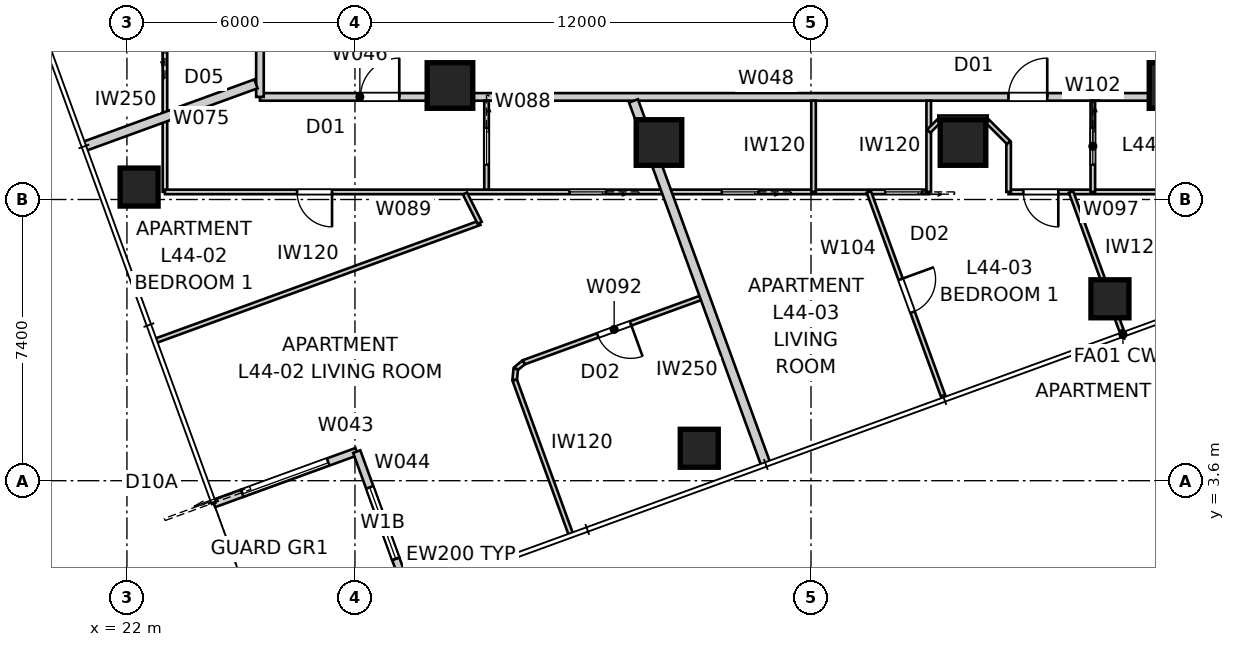
"""IFC4 building model, lengths in metres.
Left out: names, types, materials, properties, quantities, classifications, styles, units other than length and angle.
Written with IfcOpenShell. Run it as: python <this file> out.ifc"""

import sys

from ifc_helpers import new_model, si_unit, direction, frame, frame_2d, origin, origin_2d, place, context, subcontext, project, spatial, rectangle, extrude, element, fill, save


model = new_model("IFC4")
c1 = context("Model", 3, precision=1e-05, world=origin(), true_north=direction((0.0, 1.0)))
c2 = subcontext(c1, "Body", "Model", "MODEL_VIEW")
j1 = project(units=[si_unit("LENGTHUNIT", "METRE"), si_unit("PLANEANGLEUNIT", "RADIAN")], contexts=[c1])
p1 = place(None, origin())
s1 = spatial("IfcSite", under=j1, at=p1, CompositionType="ELEMENT")
p2 = place(p1, origin())
s2 = spatial("IfcBuilding", under=s1, at=p2, CompositionType="ELEMENT")
p3 = place(p2, frame((0.0, 0.0, 160.8)))
s3 = spatial("IfcBuildingStorey", under=s2, at=p3, CompositionType="ELEMENT", Elevation=160.8)
for number, where, z_axis, x_axis in (
    (1, (37.06, 4.454, 0.0), (0.0, 0.0, 1.0), (1.0, 0.0, 0.0)),
    (2, (47.866, 8.387, 0.0), (0.0, 0.0, 1.0), (1.0, 0.0, 0.0)),
    (3, (22.32, 11.327, 0.0), (0.0, 0.0, 1.0), (1.0, 0.0, 0.0)),
):
    element("IfcColumn", number, at=place(p3, frame(where, z_axis=z_axis, x_axis=x_axis)), inside=s3, PredefinedType="COLUMN", context=c2, shape_type="SweptSolid", body=[
        extrude(rectangle(XDim=1.0, YDim=1.0, at=origin_2d()), origin(), (0.0, 0.0, 1.0), 3.4),
    ])
for number, where, z_axis, x_axis in (
    (4, (30.5, 14.0, 0.0), (0.0, 0.0, 1.0), (1.0, 0.0, 0.0)),
    (5, (36.0, 12.5, 0.0), (0.0, 0.0, 1.0), (1.0, 0.0, 0.0)),
    (6, (44.0, 12.5, 0.0), (0.0, 0.0, 1.0), (1.0, 0.0, 0.0)),
    (7, (49.5, 14.0, 0.0), (0.0, 0.0, 1.0), (1.0, 0.0, 0.0)),
):
    element("IfcColumn", number, at=place(p3, frame(where, z_axis=z_axis, x_axis=x_axis)), inside=s3, PredefinedType="COLUMN", context=c2, shape_type="SweptSolid", body=[
        extrude(rectangle(XDim=1.2, YDim=1.2, at=origin_2d()), origin(), (0.0, 0.0, 1.0), 3.4),
    ])
p4 = place(p3, frame((24.288, 2.998, 0.0), z_axis=(0.0, 0.0, 1.0), x_axis=(0.939659694648, 0.342110593602, 0.0)))
e8 = element("IfcWall", 8, at=p4, inside=s3, PredefinedType="SOLIDWALL", context=c2, shape_type="SweptSolid", body=[
    extrude(rectangle(XDim=0.8, YDim=0.2, at=frame_2d((0.4, 0.0))), origin(), (0.0, 0.0, 1.0), 3.25),
])
p5 = place(p3, frame((25.04, 3.271, 0.0), z_axis=(0.0, 0.0, 1.0), x_axis=(0.939693144909, 0.342018703306, 0.0)))
e9 = element("IfcWall", 9, at=p5, inside=s3, PredefinedType="SOLIDWALL", context=c2, shape_type="SweptSolid", body=[
    extrude(rectangle(XDim=3.2, YDim=0.2, at=frame_2d((1.6, 0.0))), origin(), (0.0, 0.0, 1.0), 2.722),
])
p6 = place(p5, origin())
e10 = element("IfcOpeningElement", 10, at=p6, cuts=e9, PredefinedType="OPENING", context=c2, shape_type="SweptSolid", body=[
    extrude(rectangle(XDim=2.4, YDim=2.1, at=frame_2d((1.2, 1.05))), frame((0.0, 0.11, 0.0), z_axis=(0.0, -1.0, 0.0), x_axis=(1.0, 0.0, 0.0)), (0.0, 0.0, 1.0), 0.22),
])
p7 = place(p3, frame((28.047, 4.366, 0.0), z_axis=(0.0, 0.0, 1.0), x_axis=(0.341965219194, -0.939712609717, 0.0)))
e11 = element("IfcWall", 11, at=p7, inside=s3, PredefinedType="SOLIDWALL", context=c2, shape_type="SweptSolid", body=[
    extrude(rectangle(XDim=3.0, YDim=0.2, at=frame_2d((1.5, 0.0))), origin(), (0.0, 0.0, 1.0), 2.722),
])
p8 = place(p7, frame((1.0, 0.0, 0.45)))
e12 = element("IfcOpeningElement", 12, at=p8, cuts=e11, PredefinedType="OPENING", context=c2, shape_type="SweptSolid", body=[
    extrude(rectangle(XDim=2.0, YDim=1.8, at=frame_2d((1.0, 0.9))), frame((0.0, 0.11, 0.0), z_axis=(0.0, -1.0, 0.0), x_axis=(1.0, 0.0, 0.0)), (0.0, 0.0, 1.0), 0.22),
])
p9 = place(p3, frame((29.073, 1.547, 0.0), z_axis=(0.0, 0.0, 1.0), x_axis=(0.342037080957, -0.939686455819, 0.0)))
e13 = element("IfcWall", 13, at=p9, inside=s3, PredefinedType="SOLIDWALL", context=c2, shape_type="SweptSolid", body=[
    extrude(rectangle(XDim=1.0, YDim=0.2, at=frame_2d((0.5, 0.0))), origin(), (0.0, 0.0, 1.0), 3.25),
])
p10 = place(p3, frame((25.5, 13.7, 0.0), z_axis=(0.0, 0.0, 1.0), x_axis=(1.0, 0.0, 0.0)))
e14 = element("IfcWall", 14, at=p10, inside=s3, PredefinedType="PARTITIONING", context=c2, shape_type="SweptSolid", body=[
    extrude(rectangle(XDim=5.258, YDim=0.2, at=frame_2d((2.629, 0.0))), origin(), (0.0, 0.0, 1.0), 3.25),
])
p11 = place(p10, frame((2.646, 0.0, 0.0)))
e15 = element("IfcOpeningElement", 15, at=p11, cuts=e14, PredefinedType="OPENING", context=c2, shape_type="SweptSolid", body=[
    extrude(rectangle(XDim=1.02, YDim=2.34, at=frame_2d((0.51, 1.17))), frame((0.0, 0.11, 0.0), z_axis=(0.0, -1.0, 0.0), x_axis=(1.0, 0.0, 0.0)), (0.0, 0.0, 1.0), 0.22),
])
p12 = place(p3, frame((30.758, 13.7, 0.0), z_axis=(0.0, 0.0, 1.0), x_axis=(1.0, 0.0, 0.0)))
e16 = element("IfcWall", 16, at=p12, inside=s3, PredefinedType="PARTITIONING", context=c2, shape_type="SweptSolid", body=[
    extrude(rectangle(XDim=1.683, YDim=0.2, at=frame_2d((0.842, 0.0))), origin(), (0.0, 0.0, 1.0), 2.55),
])
p13 = place(p3, frame((32.442, 13.7, 0.0), z_axis=(0.0, 0.0, 1.0), x_axis=(1.0, 0.0, 0.0)))
e17 = element("IfcWall", 17, at=p13, inside=s3, PredefinedType="PARTITIONING", context=c2, shape_type="SweptSolid", body=[
    extrude(rectangle(XDim=15.117, YDim=0.2, at=frame_2d((7.558, 0.0))), origin(), (0.0, 0.0, 1.0), 3.25),
])
p14 = place(p13, frame((12.755, 0.0, 0.0)))
e18 = element("IfcOpeningElement", 18, at=p14, cuts=e17, PredefinedType="OPENING", context=c2, shape_type="SweptSolid", body=[
    extrude(rectangle(XDim=1.02, YDim=2.34, at=frame_2d((0.51, 1.17))), frame((0.0, 0.11, 0.0), z_axis=(0.0, -1.0, 0.0), x_axis=(1.0, 0.0, 0.0)), (0.0, 0.0, 1.0), 0.22),
])
p15 = place(p3, frame((47.558, 13.7, 0.0), z_axis=(0.0, 0.0, 1.0), x_axis=(1.0, 0.0, 0.0)))
e19 = element("IfcWall", 19, at=p15, inside=s3, PredefinedType="PARTITIONING", context=c2, shape_type="SweptSolid", body=[
    extrude(rectangle(XDim=1.683, YDim=0.2, at=frame_2d((0.842, 0.0))), origin(), (0.0, 0.0, 1.0), 2.55),
])
p16 = place(p3, frame((25.5, 47.1, 0.0), z_axis=(0.0, 0.0, 1.0), x_axis=(0.0, -1.0, 0.0)))
e20 = element("IfcWall", 20, at=p16, inside=s3, PredefinedType="PARTITIONING", context=c2, shape_type="SweptSolid", body=[
    extrude(rectangle(XDim=33.4, YDim=0.2, at=frame_2d((16.7, 0.0))), origin(), (0.0, 0.0, 1.0), 3.25),
])
p17 = place(p16, frame((2.52, 0.0, 0.0)))
e21 = element("IfcOpeningElement", 21, at=p17, cuts=e20, PredefinedType="OPENING", context=c2, shape_type="SweptSolid", body=[
    extrude(rectangle(XDim=1.02, YDim=2.34, at=frame_2d((0.51, 1.17))), frame((0.0, 0.11, 0.0), z_axis=(0.0, -1.0, 0.0), x_axis=(1.0, 0.0, 0.0)), (0.0, 0.0, 1.0), 0.22),
])
p18 = place(p16, frame((27.383, 0.0, 0.0)))
e22 = element("IfcOpeningElement", 22, at=p18, cuts=e20, PredefinedType="OPENING", context=c2, shape_type="SweptSolid", body=[
    extrude(rectangle(XDim=1.02, YDim=2.1, at=frame_2d((0.51, 1.05))), frame((0.0, 0.11, 0.0), z_axis=(0.0, -1.0, 0.0), x_axis=(1.0, 0.0, 0.0)), (0.0, 0.0, 1.0), 0.22),
])
p19 = place(p3, frame((38.812, 4.027, 0.0), z_axis=(0.0, 0.0, 1.0), x_axis=(-0.342027987857, 0.939689765573, 0.0)))
e23 = element("IfcWall", 23, at=p19, inside=s3, PredefinedType="PARTITIONING", context=c2, shape_type="SweptSolid", body=[
    extrude(rectangle(XDim=10.182, YDim=0.25, at=frame_2d((5.091, 0.0))), origin(), (0.0, 0.0, 1.0), 3.25),
])
p20 = place(p3, frame((20.868, 12.395, 0.0), z_axis=(0.0, 0.0, 1.0), x_axis=(0.939677962656, 0.342060413521, 0.0)))
e24 = element("IfcWall", 24, at=p20, inside=s3, PredefinedType="PARTITIONING", context=c2, shape_type="SweptSolid", body=[
    extrude(rectangle(XDim=4.818, YDim=0.25, at=frame_2d((2.409, 0.0))), origin(), (0.0, 0.0, 1.0), 3.25),
])
p21 = place(p3, frame((23.0, 11.2, 0.0), z_axis=(0.0, 0.0, 1.0), x_axis=(0.0, 1.0, 0.0)))
e25 = element("IfcWall", 25, at=p21, inside=s3, PredefinedType="PARTITIONING", context=c2, shape_type="SweptSolid", body=[
    extrude(rectangle(XDim=8.1, YDim=0.12, at=frame_2d((4.05, 0.0))), origin(), (0.0, 0.0, 1.0), 3.25),
])
p22 = place(p21, frame((3.849, 0.0, 0.0)))
e26 = element("IfcOpeningElement", 26, at=p22, cuts=e25, PredefinedType="OPENING", context=c2, shape_type="SweptSolid", body=[
    extrude(rectangle(XDim=0.96, YDim=2.1, at=frame_2d((0.48, 1.05))), frame((0.0, 0.07, 0.0), z_axis=(0.0, -1.0, 0.0), x_axis=(1.0, 0.0, 0.0)), (0.0, 0.0, 1.0), 0.14),
])
p23 = place(p3, frame((31.462, 13.6, 0.0), z_axis=(0.0, 0.0, 1.0), x_axis=(0.0, -1.0, 0.0)))
e27 = element("IfcWall", 27, at=p23, inside=s3, PredefinedType="PARTITIONING", context=c2, shape_type="SweptSolid", body=[
    extrude(rectangle(XDim=2.4, YDim=0.12, at=frame_2d((1.2, 0.0))), origin(), (0.0, 0.0, 1.0), 3.25),
])
p24 = place(p23, frame((0.72, 0.0, 0.0)))
e28 = element("IfcOpeningElement", 28, at=p24, cuts=e27, PredefinedType="OPENING", context=c2, shape_type="SweptSolid", body=[
    extrude(rectangle(XDim=0.96, YDim=2.1, at=frame_2d((0.48, 1.05))), frame((0.0, 0.07, 0.0), z_axis=(0.0, -1.0, 0.0), x_axis=(1.0, 0.0, 0.0)), (0.0, 0.0, 1.0), 0.14),
])
p25 = place(p3, frame((43.098, 11.2, 0.0), z_axis=(0.0, 0.0, 1.0), x_axis=(-1.0, 0.0, 0.0)))
e29 = element("IfcWall", 29, at=p25, inside=s3, PredefinedType="PARTITIONING", context=c2, shape_type="SweptSolid", body=[
    extrude(rectangle(XDim=20.098, YDim=0.12, at=frame_2d((10.049, 0.0))), origin(), (0.0, 0.0, 1.0), 3.25),
])
p26 = place(p25, frame((15.701, 0.0, 0.0)))
e30 = element("IfcOpeningElement", 30, at=p26, cuts=e29, PredefinedType="OPENING", context=c2, shape_type="SweptSolid", body=[
    extrude(rectangle(XDim=0.92, YDim=2.34, at=frame_2d((0.46, 1.17))), frame((0.0, 0.07, 0.0), z_axis=(0.0, -1.0, 0.0), x_axis=(1.0, 0.0, 0.0)), (0.0, 0.0, 1.0), 0.14),
])
p27 = place(p25, frame((8.49, 0.0, 0.0)))
e31 = element("IfcOpeningElement", 31, at=p27, cuts=e29, PredefinedType="OPENING", context=c2, shape_type="SweptSolid", body=[
    extrude(rectangle(XDim=0.96, YDim=2.1, at=frame_2d((0.48, 1.05))), frame((0.0, 0.07, 0.0), z_axis=(0.0, -1.0, 0.0), x_axis=(1.0, 0.0, 0.0)), (0.0, 0.0, 1.0), 0.14),
])
p28 = place(p25, frame((0.185, 0.0, 0.0)))
e32 = element("IfcOpeningElement", 32, at=p28, cuts=e29, PredefinedType="OPENING", context=c2, shape_type="SweptSolid", body=[
    extrude(rectangle(XDim=0.96, YDim=2.1, at=frame_2d((0.48, 1.05))), frame((0.0, 0.07, 0.0), z_axis=(0.0, -1.0, 0.0), x_axis=(1.0, 0.0, 0.0)), (0.0, 0.0, 1.0), 0.14),
])
p29 = place(p25, frame((4.484, 0.0, 0.0)))
e33 = element("IfcOpeningElement", 33, at=p29, cuts=e29, PredefinedType="OPENING", context=c2, shape_type="SweptSolid", body=[
    extrude(rectangle(XDim=0.96, YDim=2.1, at=frame_2d((0.48, 1.05))), frame((0.0, 0.07, 0.0), z_axis=(0.0, -1.0, 0.0), x_axis=(1.0, 0.0, 0.0)), (0.0, 0.0, 1.0), 0.14),
])
p30 = place(p3, frame((22.769, 7.287, 0.0), z_axis=(0.0, 0.0, 1.0), x_axis=(0.939692673089, 0.342019999623, 0.0)))
e34 = element("IfcWall", 34, at=p30, inside=s3, PredefinedType="PARTITIONING", context=c2, shape_type="SweptSolid", body=[
    extrude(rectangle(XDim=9.06, YDim=0.12, at=frame_2d((4.53, 0.0))), origin(), (0.0, 0.0, 1.0), 3.25),
])
p31 = place(p3, frame((31.283, 10.385, 0.0), z_axis=(0.0, 0.0, 1.0), x_axis=(-0.448117513314, 0.893974660861, 0.0)))
e35 = element("IfcWall", 35, at=p31, inside=s3, PredefinedType="PARTITIONING", context=c2, shape_type="SweptSolid", body=[
    extrude(rectangle(XDim=0.864, YDim=0.12, at=frame_2d((0.432, 0.0))), origin(), (0.0, 0.0, 1.0), 3.25),
])
p32 = place(p3, frame((37.202, 8.449, 0.0), z_axis=(0.0, 0.0, 1.0), x_axis=(-0.939692115443, -0.34202153174, 0.0)))
e36 = element("IfcWall", 36, at=p32, inside=s3, PredefinedType="PARTITIONING", context=c2, shape_type="SweptSolid", body=[
    extrude(rectangle(XDim=5.068, YDim=0.12, at=frame_2d((2.534, 0.0))), origin(), (0.0, 0.0, 1.0), 3.25),
])
p33 = place(p32, frame((2.074, 0.0, 0.0)))
e37 = element("IfcOpeningElement", 37, at=p33, cuts=e36, PredefinedType="OPENING", context=c2, shape_type="SweptSolid", body=[
    extrude(rectangle(XDim=0.92, YDim=2.34, at=frame_2d((0.46, 1.17))), frame((0.0, 0.07, 0.0), z_axis=(0.0, -1.0, 0.0), x_axis=(1.0, 0.0, 0.0)), (0.0, 0.0, 1.0), 0.14),
])
p34 = place(p3, frame((32.44, 6.715, 0.0), z_axis=(0.0, 0.0, 1.0), x_axis=(-0.769401529914, -0.638765438769, 0.0)))
e38 = element("IfcWall", 38, at=p34, inside=s3, PredefinedType="PARTITIONING", context=c2, shape_type="SweptSolid", body=[
    extrude(rectangle(XDim=0.271, YDim=0.12, at=frame_2d((0.135, 0.0))), origin(), (0.0, 0.0, 1.0), 3.25),
])
p35 = place(p3, frame((32.231, 6.542, 0.0), z_axis=(0.0, 0.0, 1.0), x_axis=(-0.093212941297, -0.995646195983, 0.0)))
e39 = element("IfcWall", 39, at=p35, inside=s3, PredefinedType="PARTITIONING", context=c2, shape_type="SweptSolid", body=[
    extrude(rectangle(XDim=0.296, YDim=0.12, at=frame_2d((0.148, 0.0))), origin(), (0.0, 0.0, 1.0), 3.25),
])
p36 = place(p3, frame((32.204, 6.248, 0.0), z_axis=(0.0, 0.0, 1.0), x_axis=(0.342011603146, -0.939695729113, 0.0)))
e40 = element("IfcWall", 40, at=p36, inside=s3, PredefinedType="PARTITIONING", context=c2, shape_type="SweptSolid", body=[
    extrude(rectangle(XDim=4.307, YDim=0.12, at=frame_2d((2.153, 0.0))), origin(), (0.0, 0.0, 1.0), 3.25),
])
p37 = place(p3, frame((43.098, 11.2, 0.0), z_axis=(0.0, 0.0, 1.0), x_axis=(0.0, 1.0, 0.0)))
e41 = element("IfcWall", 41, at=p37, inside=s3, PredefinedType="PARTITIONING", context=c2, shape_type="SweptSolid", body=[
    extrude(rectangle(XDim=2.4, YDim=0.12, at=frame_2d((1.2, 0.0))), origin(), (0.0, 0.0, 1.0), 3.25),
])
p38 = place(p3, frame((52.164, 11.2, 0.0), z_axis=(0.0, 0.0, 1.0), x_axis=(-1.0, 0.0, 0.0)))
e42 = element("IfcWall", 42, at=p38, inside=s3, PredefinedType="PARTITIONING", context=c2, shape_type="SweptSolid", body=[
    extrude(rectangle(XDim=6.964, YDim=0.12, at=frame_2d((3.482, 0.0))), origin(), (0.0, 0.0, 1.0), 3.25),
])
p39 = place(p38, frame((5.656, 0.0, 0.0)))
e43 = element("IfcOpeningElement", 43, at=p39, cuts=e42, PredefinedType="OPENING", context=c2, shape_type="SweptSolid", body=[
    extrude(rectangle(XDim=0.92, YDim=2.34, at=frame_2d((0.46, 1.17))), frame((0.0, 0.07, 0.0), z_axis=(0.0, -1.0, 0.0), x_axis=(1.0, 0.0, 0.0)), (0.0, 0.0, 1.0), 0.14),
])
p40 = place(p38, frame((1.919, 0.0, 0.0)))
e44 = element("IfcOpeningElement", 44, at=p40, cuts=e42, PredefinedType="OPENING", context=c2, shape_type="SweptSolid", body=[
    extrude(rectangle(XDim=0.96, YDim=2.1, at=frame_2d((0.48, 1.05))), frame((0.0, 0.07, 0.0), z_axis=(0.0, -1.0, 0.0), x_axis=(1.0, 0.0, 0.0)), (0.0, 0.0, 1.0), 0.14),
])
p41 = place(p3, frame((45.2, 11.2, 0.0), z_axis=(0.0, 0.0, 1.0), x_axis=(0.0, 1.0, 0.0)))
e45 = element("IfcWall", 45, at=p41, inside=s3, PredefinedType="PARTITIONING", context=c2, shape_type="SweptSolid", body=[
    extrude(rectangle(XDim=1.3, YDim=0.12, at=frame_2d((0.65, 0.0))), origin(), (0.0, 0.0, 1.0), 3.25),
])
p42 = place(p3, frame((45.2, 12.5, 0.0), z_axis=(0.0, 0.0, 1.0), x_axis=(-0.707106781187, 0.707106781187, 0.0)))
e46 = element("IfcWall", 46, at=p42, inside=s3, PredefinedType="PARTITIONING", context=c2, shape_type="SweptSolid", body=[
    extrude(rectangle(XDim=0.778, YDim=0.12, at=frame_2d((0.389, 0.0))), origin(), (0.0, 0.0, 1.0), 3.25),
])
p43 = place(p3, frame((44.65, 13.15, 0.0), z_axis=(0.0, 0.0, 1.0), x_axis=(-1.0, 0.0, 0.0)))
e47 = element("IfcWall", 47, at=p43, inside=s3, PredefinedType="PARTITIONING", context=c2, shape_type="SweptSolid", body=[
    extrude(rectangle(XDim=1.3, YDim=0.12, at=frame_2d((0.65, 0.0))), origin(), (0.0, 0.0, 1.0), 3.25),
])
p44 = place(p3, frame((43.35, 13.05, 0.0), z_axis=(0.0, 0.0, 1.0), x_axis=(-0.707106781187, -0.707106781187, 0.0)))
e48 = element("IfcWall", 48, at=p44, inside=s3, PredefinedType="PARTITIONING", context=c2, shape_type="SweptSolid", body=[
    extrude(rectangle(XDim=0.357, YDim=0.12, at=frame_2d((0.178, 0.0))), origin(), (0.0, 0.0, 1.0), 3.25),
])
p45 = place(p3, frame((47.416, 13.6, 0.0), z_axis=(0.0, 0.0, 1.0), x_axis=(0.0, -1.0, 0.0)))
e49 = element("IfcWall", 49, at=p45, inside=s3, PredefinedType="PARTITIONING", context=c2, shape_type="SweptSolid", body=[
    extrude(rectangle(XDim=2.4, YDim=0.12, at=frame_2d((1.2, 0.0))), origin(), (0.0, 0.0, 1.0), 3.25),
])
p46 = place(p45, frame((0.72, 0.0, 0.0)))
e50 = element("IfcOpeningElement", 50, at=p46, cuts=e49, PredefinedType="OPENING", context=c2, shape_type="SweptSolid", body=[
    extrude(rectangle(XDim=0.96, YDim=2.1, at=frame_2d((0.48, 1.05))), frame((0.0, 0.07, 0.0), z_axis=(0.0, -1.0, 0.0), x_axis=(1.0, 0.0, 0.0)), (0.0, 0.0, 1.0), 0.14),
])
p47 = place(p3, frame((40.067, 13.6, 0.0), z_axis=(0.0, 0.0, 1.0), x_axis=(0.0, -1.0, 0.0)))
e51 = element("IfcWall", 51, at=p47, inside=s3, PredefinedType="PARTITIONING", context=c2, shape_type="SweptSolid", body=[
    extrude(rectangle(XDim=2.4, YDim=0.12, at=frame_2d((1.2, 0.0))), origin(), (0.0, 0.0, 1.0), 2.796),
])
p48 = place(p3, frame((41.522, 11.2, 0.0), z_axis=(0.0, 0.0, 1.0), x_axis=(0.342028262279, -0.939689665689, 0.0)))
e52 = element("IfcWall", 52, at=p48, inside=s3, PredefinedType="PARTITIONING", context=c2, shape_type="SweptSolid", body=[
    extrude(rectangle(XDim=5.773, YDim=0.12, at=frame_2d((2.887, 0.0))), origin(), (0.0, 0.0, 1.0), 3.25),
])
p49 = place(p48, frame((2.447, 0.0, 0.0)))
e53 = element("IfcOpeningElement", 53, at=p49, cuts=e52, PredefinedType="OPENING", context=c2, shape_type="SweptSolid", body=[
    extrude(rectangle(XDim=0.92, YDim=2.34, at=frame_2d((0.46, 1.17))), frame((0.0, 0.07, 0.0), z_axis=(0.0, -1.0, 0.0), x_axis=(1.0, 0.0, 0.0)), (0.0, 0.0, 1.0), 0.14),
])
p50 = place(p3, frame((46.843, 11.2, 0.0), z_axis=(0.0, 0.0, 1.0), x_axis=(0.341990966768, -0.939703239672, 0.0)))
e54 = element("IfcWall", 54, at=p50, inside=s3, PredefinedType="PARTITIONING", context=c2, shape_type="SweptSolid", body=[
    extrude(rectangle(XDim=3.953, YDim=0.12, at=frame_2d((1.977, 0.0))), origin(), (0.0, 0.0, 1.0), 3.25),
])
p51 = place(p6, origin())
e55 = element("IfcDoor", 55, at=p51, inside=s3, OperationType="SLIDING_TO_LEFT", PredefinedType="DOOR", context=c2, shape_type="SweptSolid", body=[
    extrude(rectangle(XDim=2.4, YDim=2.1, at=frame_2d((1.2, 1.05))), frame((0.0, 0.025, 0.0), z_axis=(0.0, -1.0, 0.0), x_axis=(1.0, 0.0, 0.0)), (0.0, 0.0, 1.0), 0.05),
])
fill(e10, e55)
p52 = place(p8, origin())
e56 = element("IfcWindow", 56, at=p52, inside=s3, PartitioningType="SINGLE_PANEL", PredefinedType="WINDOW", context=c2, shape_type="SweptSolid", body=[
    extrude(rectangle(XDim=2.0, YDim=1.8, at=frame_2d((1.0, 0.9))), frame((0.0, 0.03, 0.0), z_axis=(0.0, -1.0, 0.0), x_axis=(1.0, 0.0, 0.0)), (0.0, 0.0, 1.0), 0.06),
])
fill(e12, e56)
p53 = place(p11, origin())
e57 = element("IfcDoor", 57, at=p53, inside=s3, OperationType="SINGLE_SWING_RIGHT", PredefinedType="DOOR", context=c2, shape_type="SweptSolid", body=[
    extrude(rectangle(XDim=1.02, YDim=2.34, at=frame_2d((0.51, 1.17))), frame((0.0, 0.025, 0.0), z_axis=(0.0, -1.0, 0.0), x_axis=(1.0, 0.0, 0.0)), (0.0, 0.0, 1.0), 0.05),
])
fill(e15, e57)
p54 = place(p14, origin())
e58 = element("IfcDoor", 58, at=p54, inside=s3, OperationType="SINGLE_SWING_RIGHT", PredefinedType="DOOR", context=c2, shape_type="SweptSolid", body=[
    extrude(rectangle(XDim=1.02, YDim=2.34, at=frame_2d((0.51, 1.17))), frame((0.0, 0.025, 0.0), z_axis=(0.0, -1.0, 0.0), x_axis=(1.0, 0.0, 0.0)), (0.0, 0.0, 1.0), 0.05),
])
fill(e18, e58)
p55 = place(p26, origin())
e59 = element("IfcDoor", 59, at=p55, inside=s3, OperationType="SINGLE_SWING_LEFT", PredefinedType="DOOR", context=c2, shape_type="SweptSolid", body=[
    extrude(rectangle(XDim=0.92, YDim=2.34, at=frame_2d((0.46, 1.17))), frame((0.0, 0.025, 0.0), z_axis=(0.0, -1.0, 0.0), x_axis=(1.0, 0.0, 0.0)), (0.0, 0.0, 1.0), 0.05),
])
fill(e30, e59)
p56 = place(p24, origin())
e60 = element("IfcDoor", 60, at=p56, inside=s3, OperationType="SLIDING_TO_LEFT", PredefinedType="DOOR", context=c2, shape_type="SweptSolid", body=[
    extrude(rectangle(XDim=0.96, YDim=2.1, at=frame_2d((0.48, 1.05))), frame((0.0, 0.025, 0.0), z_axis=(0.0, -1.0, 0.0), x_axis=(1.0, 0.0, 0.0)), (0.0, 0.0, 1.0), 0.05),
])
fill(e28, e60)
p57 = place(p46, origin())
e61 = element("IfcDoor", 61, at=p57, inside=s3, OperationType="SLIDING_TO_LEFT", PredefinedType="DOOR", context=c2, shape_type="SweptSolid", body=[
    extrude(rectangle(XDim=0.96, YDim=2.1, at=frame_2d((0.48, 1.05))), frame((0.0, 0.025, 0.0), z_axis=(0.0, -1.0, 0.0), x_axis=(1.0, 0.0, 0.0)), (0.0, 0.0, 1.0), 0.05),
])
fill(e50, e61)
p58 = place(p39, origin())
e62 = element("IfcDoor", 62, at=p58, inside=s3, OperationType="SINGLE_SWING_LEFT", PredefinedType="DOOR", context=c2, shape_type="SweptSolid", body=[
    extrude(rectangle(XDim=0.92, YDim=2.34, at=frame_2d((0.46, 1.17))), frame((0.0, 0.025, 0.0), z_axis=(0.0, -1.0, 0.0), x_axis=(1.0, 0.0, 0.0)), (0.0, 0.0, 1.0), 0.05),
])
fill(e43, e62)
p59 = place(p27, origin())
e63 = element("IfcDoor", 63, at=p59, inside=s3, OperationType="SLIDING_TO_LEFT", PredefinedType="DOOR", context=c2, shape_type="SweptSolid", body=[
    extrude(rectangle(XDim=0.96, YDim=2.1, at=frame_2d((0.48, 1.05))), frame((0.0, 0.025, 0.0), z_axis=(0.0, -1.0, 0.0), x_axis=(1.0, 0.0, 0.0)), (0.0, 0.0, 1.0), 0.05),
])
fill(e31, e63)
p60 = place(p33, origin())
e64 = element("IfcDoor", 64, at=p60, inside=s3, OperationType="SINGLE_SWING_LEFT", PredefinedType="DOOR", context=c2, shape_type="SweptSolid", body=[
    extrude(rectangle(XDim=0.92, YDim=2.34, at=frame_2d((0.46, 1.17))), frame((0.0, 0.025, 0.0), z_axis=(0.0, -1.0, 0.0), x_axis=(1.0, 0.0, 0.0)), (0.0, 0.0, 1.0), 0.05),
])
fill(e37, e64)
p61 = place(p49, origin())
e65 = element("IfcDoor", 65, at=p61, inside=s3, OperationType="SINGLE_SWING_LEFT", PredefinedType="DOOR", context=c2, shape_type="SweptSolid", body=[
    extrude(rectangle(XDim=0.92, YDim=2.34, at=frame_2d((0.46, 1.17))), frame((0.0, 0.025, 0.0), z_axis=(0.0, -1.0, 0.0), x_axis=(1.0, 0.0, 0.0)), (0.0, 0.0, 1.0), 0.05),
])
fill(e53, e65)
p62 = place(p28, origin())
e66 = element("IfcDoor", 66, at=p62, inside=s3, OperationType="SLIDING_TO_LEFT", PredefinedType="DOOR", context=c2, shape_type="SweptSolid", body=[
    extrude(rectangle(XDim=0.96, YDim=2.1, at=frame_2d((0.48, 1.05))), frame((0.0, 0.025, 0.0), z_axis=(0.0, -1.0, 0.0), x_axis=(1.0, 0.0, 0.0)), (0.0, 0.0, 1.0), 0.05),
])
fill(e32, e66)
p63 = place(p29, origin())
e67 = element("IfcDoor", 67, at=p63, inside=s3, OperationType="SLIDING_TO_LEFT", PredefinedType="DOOR", context=c2, shape_type="SweptSolid", body=[
    extrude(rectangle(XDim=0.96, YDim=2.1, at=frame_2d((0.48, 1.05))), frame((0.0, 0.025, 0.0), z_axis=(0.0, -1.0, 0.0), x_axis=(1.0, 0.0, 0.0)), (0.0, 0.0, 1.0), 0.05),
])
fill(e33, e67)
save(model, sys.argv[1])
